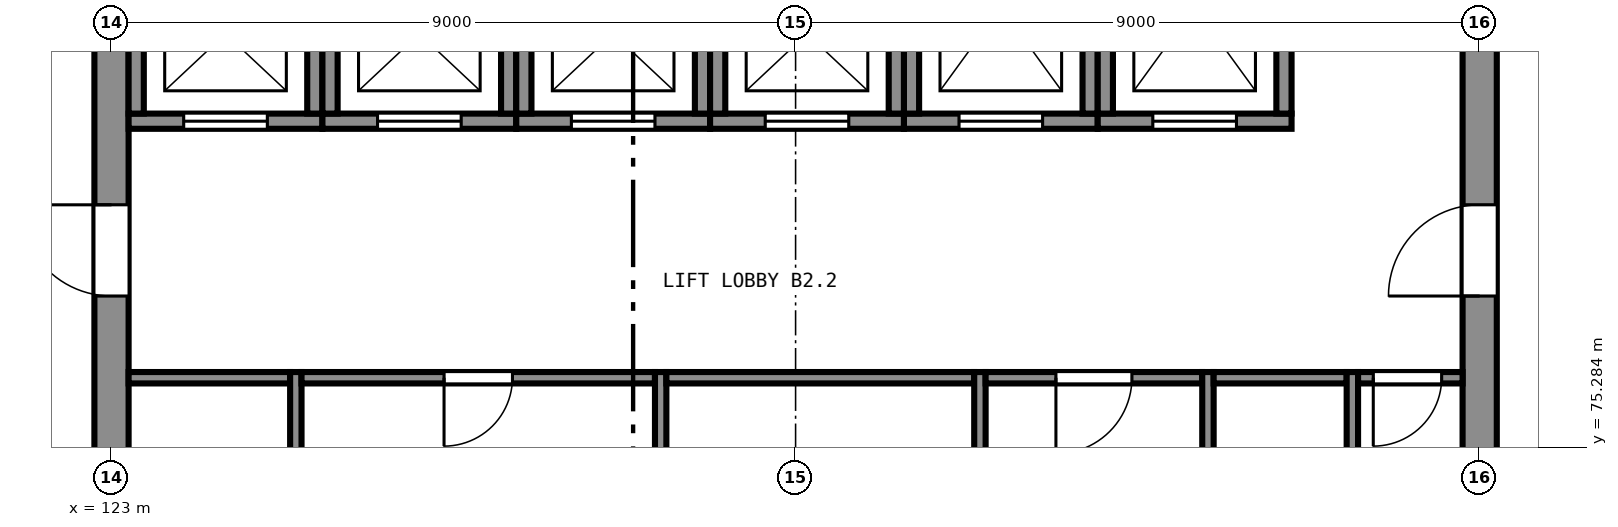
"""IFC4 building model, lengths in metres.
Left out: names, types, materials, properties, quantities, classifications, styles, units other than length and angle.
Written with IfcOpenShell. Run it as: python <this file> out.ifc"""

import sys

from ifc_helpers import new_model, si_unit, direction, frame, frame_2d, origin, place, context, subcontext, project, spatial, rectangle, extrude, element, fill, save


model = new_model("IFC4")
c1 = context("Model", 3, precision=1e-05, world=origin(), true_north=direction((0.0, 1.0)))
c2 = subcontext(c1, "Body", "Model", "MODEL_VIEW")
j1 = project(units=[si_unit("LENGTHUNIT", "METRE"), si_unit("PLANEANGLEUNIT", "RADIAN")], contexts=[c1])
p1 = place(None, origin())
s1 = spatial("IfcSite", under=j1, at=p1, CompositionType="ELEMENT")
p2 = place(p1, origin())
s2 = spatial("IfcBuilding", under=s1, at=p2, CompositionType="ELEMENT")
p3 = place(p2, frame((0.0, 0.0, -10.0)))
s3 = spatial("IfcBuildingStorey", under=s2, at=p3, CompositionType="ELEMENT", Elevation=-10.0)
p4 = place(p3, frame((141.0, 65.225, 0.0), z_axis=(0.0, 0.0, 1.0), x_axis=(0.0, 1.0, 0.0)))
e1 = element("IfcWall", 1, at=p4, inside=s3, PredefinedType="SHEAR", context=c2, shape_type="SweptSolid", body=[
    extrude(rectangle(XDim=17.55, YDim=0.45, at=frame_2d((8.775, 0.0))), origin(), (0.0, 0.0, 1.0), 5.0),
])
p5 = place(p4, frame((4.3, 0.0, 0.0)))
e2 = element("IfcOpeningElement", 2, at=p5, cuts=e1, PredefinedType="OPENING", context=c2, shape_type="SweptSolid", body=[
    extrude(rectangle(XDim=1.2, YDim=2.1, at=frame_2d((0.6, 1.05))), frame((0.0, 0.235, 0.0), z_axis=(0.0, -1.0, 0.0), x_axis=(1.0, 0.0, 0.0)), (0.0, 0.0, 1.0), 0.47),
])
p6 = place(p4, frame((12.05, 0.0, 0.0)))
e3 = element("IfcOpeningElement", 3, at=p6, cuts=e1, PredefinedType="OPENING", context=c2, shape_type="SweptSolid", body=[
    extrude(rectangle(XDim=1.2, YDim=2.1, at=frame_2d((0.6, 1.05))), frame((0.0, 0.235, 0.0), z_axis=(0.0, -1.0, 0.0), x_axis=(1.0, 0.0, 0.0)), (0.0, 0.0, 1.0), 0.47),
])
p7 = place(p3, frame((123.0, 82.775, 0.0), z_axis=(0.0, 0.0, 1.0), x_axis=(0.0, -1.0, 0.0)))
e4 = element("IfcWall", 4, at=p7, inside=s3, PredefinedType="SHEAR", context=c2, shape_type="SweptSolid", body=[
    extrude(rectangle(XDim=17.55, YDim=0.45, at=frame_2d((8.775, 0.0))), origin(), (0.0, 0.0, 1.0), 5.0),
])
p8 = place(p7, frame((12.05, 0.0, 0.0)))
e5 = element("IfcOpeningElement", 5, at=p8, cuts=e4, PredefinedType="OPENING", context=c2, shape_type="SweptSolid", body=[
    extrude(rectangle(XDim=1.2, YDim=2.1, at=frame_2d((0.6, 1.05))), frame((0.0, 0.235, 0.0), z_axis=(0.0, -1.0, 0.0), x_axis=(1.0, 0.0, 0.0)), (0.0, 0.0, 1.0), 0.47),
])
p9 = place(p7, frame((4.3, 0.0, 0.0)))
e6 = element("IfcOpeningElement", 6, at=p9, cuts=e4, PredefinedType="OPENING", context=c2, shape_type="SweptSolid", body=[
    extrude(rectangle(XDim=1.2, YDim=2.1, at=frame_2d((0.6, 1.05))), frame((0.0, 0.235, 0.0), z_axis=(0.0, -1.0, 0.0), x_axis=(1.0, 0.0, 0.0)), (0.0, 0.0, 1.0), 0.47),
])
p10 = place(p3, frame((123.225, 79.575, -1.9), z_axis=(0.0, 0.0, 1.0), x_axis=(1.0, 0.0, 0.0)))
e7 = element("IfcWall", 7, at=p10, inside=s3, PredefinedType="SHEAR", context=c2, shape_type="SweptSolid", body=[
    extrude(rectangle(XDim=2.55, YDim=0.2, at=frame_2d((1.275, 0.0))), origin(), (0.0, 0.0, 1.0), 6.9),
])
p11 = place(p10, frame((0.725, 0.0, 1.9)))
e8 = element("IfcOpeningElement", 8, at=p11, cuts=e7, PredefinedType="OPENING", context=c2, shape_type="SweptSolid", body=[
    extrude(rectangle(XDim=1.1, YDim=2.1, at=frame_2d((0.55, 1.05))), frame((0.0, 0.11, 0.0), z_axis=(0.0, -1.0, 0.0), x_axis=(1.0, 0.0, 0.0)), (0.0, 0.0, 1.0), 0.22),
])
for number, where, z_axis, x_axis in (
    (9, (125.675, 79.675, -1.9), (0.0, 0.0, 1.0), (0.0, 1.0, 0.0)),
    (10, (123.325, 81.775, -1.9), (0.0, 0.0, 1.0), (0.0, -1.0, 0.0)),
):
    element("IfcWall", number, at=place(p3, frame(where, z_axis=z_axis, x_axis=x_axis)), inside=s3, PredefinedType="SHEAR", context=c2, shape_type="SweptSolid", body=[
        extrude(rectangle(XDim=2.1, YDim=0.2, at=frame_2d((1.05, 0.0))), origin(), (0.0, 0.0, 1.0), 6.9),
    ])
p12 = place(p3, frame((125.775, 79.575, -1.9), z_axis=(0.0, 0.0, 1.0), x_axis=(1.0, 0.0, 0.0)))
e11 = element("IfcWall", 11, at=p12, inside=s3, PredefinedType="SHEAR", context=c2, shape_type="SweptSolid", body=[
    extrude(rectangle(XDim=2.55, YDim=0.2, at=frame_2d((1.275, 0.0))), origin(), (0.0, 0.0, 1.0), 6.9),
])
p13 = place(p12, frame((0.725, 0.0, 1.9)))
e12 = element("IfcOpeningElement", 12, at=p13, cuts=e11, PredefinedType="OPENING", context=c2, shape_type="SweptSolid", body=[
    extrude(rectangle(XDim=1.1, YDim=2.1, at=frame_2d((0.55, 1.05))), frame((0.0, 0.11, 0.0), z_axis=(0.0, -1.0, 0.0), x_axis=(1.0, 0.0, 0.0)), (0.0, 0.0, 1.0), 0.22),
])
for number, where, z_axis, x_axis in (
    (13, (128.225, 79.675, -1.9), (0.0, 0.0, 1.0), (0.0, 1.0, 0.0)),
    (14, (125.875, 81.775, -1.9), (0.0, 0.0, 1.0), (0.0, -1.0, 0.0)),
):
    element("IfcWall", number, at=place(p3, frame(where, z_axis=z_axis, x_axis=x_axis)), inside=s3, PredefinedType="SHEAR", context=c2, shape_type="SweptSolid", body=[
        extrude(rectangle(XDim=2.1, YDim=0.2, at=frame_2d((1.05, 0.0))), origin(), (0.0, 0.0, 1.0), 6.9),
    ])
p14 = place(p3, frame((128.325, 79.575, -1.9), z_axis=(0.0, 0.0, 1.0), x_axis=(1.0, 0.0, 0.0)))
e15 = element("IfcWall", 15, at=p14, inside=s3, PredefinedType="SHEAR", context=c2, shape_type="SweptSolid", body=[
    extrude(rectangle(XDim=2.55, YDim=0.2, at=frame_2d((1.275, 0.0))), origin(), (0.0, 0.0, 1.0), 6.9),
])
p15 = place(p14, frame((0.725, 0.0, 1.9)))
e16 = element("IfcOpeningElement", 16, at=p15, cuts=e15, PredefinedType="OPENING", context=c2, shape_type="SweptSolid", body=[
    extrude(rectangle(XDim=1.1, YDim=2.1, at=frame_2d((0.55, 1.05))), frame((0.0, 0.11, 0.0), z_axis=(0.0, -1.0, 0.0), x_axis=(1.0, 0.0, 0.0)), (0.0, 0.0, 1.0), 0.22),
])
for number, where, z_axis, x_axis in (
    (17, (130.775, 79.675, -1.9), (0.0, 0.0, 1.0), (0.0, 1.0, 0.0)),
    (18, (128.425, 81.775, -1.9), (0.0, 0.0, 1.0), (0.0, -1.0, 0.0)),
):
    element("IfcWall", number, at=place(p3, frame(where, z_axis=z_axis, x_axis=x_axis)), inside=s3, PredefinedType="SHEAR", context=c2, shape_type="SweptSolid", body=[
        extrude(rectangle(XDim=2.1, YDim=0.2, at=frame_2d((1.05, 0.0))), origin(), (0.0, 0.0, 1.0), 6.9),
    ])
p16 = place(p3, frame((130.875, 79.575, -1.9), z_axis=(0.0, 0.0, 1.0), x_axis=(1.0, 0.0, 0.0)))
e19 = element("IfcWall", 19, at=p16, inside=s3, PredefinedType="SHEAR", context=c2, shape_type="SweptSolid", body=[
    extrude(rectangle(XDim=2.55, YDim=0.2, at=frame_2d((1.275, 0.0))), origin(), (0.0, 0.0, 1.0), 6.9),
])
p17 = place(p16, frame((0.725, 0.0, 1.9)))
e20 = element("IfcOpeningElement", 20, at=p17, cuts=e19, PredefinedType="OPENING", context=c2, shape_type="SweptSolid", body=[
    extrude(rectangle(XDim=1.1, YDim=2.1, at=frame_2d((0.55, 1.05))), frame((0.0, 0.11, 0.0), z_axis=(0.0, -1.0, 0.0), x_axis=(1.0, 0.0, 0.0)), (0.0, 0.0, 1.0), 0.22),
])
for number, where, z_axis, x_axis in (
    (21, (133.325, 79.675, -1.9), (0.0, 0.0, 1.0), (0.0, 1.0, 0.0)),
    (22, (130.975, 81.775, -1.9), (0.0, 0.0, 1.0), (0.0, -1.0, 0.0)),
):
    element("IfcWall", number, at=place(p3, frame(where, z_axis=z_axis, x_axis=x_axis)), inside=s3, PredefinedType="SHEAR", context=c2, shape_type="SweptSolid", body=[
        extrude(rectangle(XDim=2.1, YDim=0.2, at=frame_2d((1.05, 0.0))), origin(), (0.0, 0.0, 1.0), 6.9),
    ])
p18 = place(p3, frame((133.425, 79.575, -1.9), z_axis=(0.0, 0.0, 1.0), x_axis=(1.0, 0.0, 0.0)))
e23 = element("IfcWall", 23, at=p18, inside=s3, PredefinedType="SHEAR", context=c2, shape_type="SweptSolid", body=[
    extrude(rectangle(XDim=2.55, YDim=0.2, at=frame_2d((1.275, 0.0))), origin(), (0.0, 0.0, 1.0), 6.9),
])
p19 = place(p18, frame((0.725, 0.0, 1.9)))
e24 = element("IfcOpeningElement", 24, at=p19, cuts=e23, PredefinedType="OPENING", context=c2, shape_type="SweptSolid", body=[
    extrude(rectangle(XDim=1.1, YDim=2.1, at=frame_2d((0.55, 1.05))), frame((0.0, 0.11, 0.0), z_axis=(0.0, -1.0, 0.0), x_axis=(1.0, 0.0, 0.0)), (0.0, 0.0, 1.0), 0.22),
])
for number, where, z_axis, x_axis in (
    (25, (135.875, 79.675, -1.9), (0.0, 0.0, 1.0), (0.0, 1.0, 0.0)),
    (26, (133.525, 82.475, -1.9), (0.0, 0.0, 1.0), (0.0, -1.0, 0.0)),
):
    element("IfcWall", number, at=place(p3, frame(where, z_axis=z_axis, x_axis=x_axis)), inside=s3, PredefinedType="SHEAR", context=c2, shape_type="SweptSolid", body=[
        extrude(rectangle(XDim=2.8, YDim=0.2, at=frame_2d((1.4, 0.0))), origin(), (0.0, 0.0, 1.0), 6.9),
    ])
p20 = place(p3, frame((135.975, 79.575, -1.9), z_axis=(0.0, 0.0, 1.0), x_axis=(1.0, 0.0, 0.0)))
e27 = element("IfcWall", 27, at=p20, inside=s3, PredefinedType="SHEAR", context=c2, shape_type="SweptSolid", body=[
    extrude(rectangle(XDim=2.55, YDim=0.2, at=frame_2d((1.275, 0.0))), origin(), (0.0, 0.0, 1.0), 6.9),
])
p21 = place(p20, frame((0.725, 0.0, 1.9)))
e28 = element("IfcOpeningElement", 28, at=p21, cuts=e27, PredefinedType="OPENING", context=c2, shape_type="SweptSolid", body=[
    extrude(rectangle(XDim=1.1, YDim=2.1, at=frame_2d((0.55, 1.05))), frame((0.0, 0.11, 0.0), z_axis=(0.0, -1.0, 0.0), x_axis=(1.0, 0.0, 0.0)), (0.0, 0.0, 1.0), 0.22),
])
for number, where, z_axis, x_axis in (
    (29, (138.425, 79.675, -1.9), (0.0, 0.0, 1.0), (0.0, 1.0, 0.0)),
    (30, (136.075, 82.475, -1.9), (0.0, 0.0, 1.0), (0.0, -1.0, 0.0)),
):
    element("IfcWall", number, at=place(p3, frame(where, z_axis=z_axis, x_axis=x_axis)), inside=s3, PredefinedType="SHEAR", context=c2, shape_type="SweptSolid", body=[
        extrude(rectangle(XDim=2.8, YDim=0.2, at=frame_2d((1.4, 0.0))), origin(), (0.0, 0.0, 1.0), 6.9),
    ])
p22 = place(p3, frame((125.425, 71.725, 0.0), z_axis=(0.0, 0.0, 1.0), x_axis=(0.0, 1.0, 0.0)))
e31 = element("IfcWall", 31, at=p22, inside=s3, PredefinedType="PARTITIONING", context=c2, shape_type="SweptSolid", body=[
    extrude(rectangle(XDim=4.55, YDim=0.15, at=frame_2d((2.275, 0.0))), origin(), (0.0, 0.0, 1.0), 4.7),
])
p23 = place(p3, frame((123.225, 76.2, 0.0), z_axis=(0.0, 0.0, 1.0), x_axis=(1.0, 0.0, 0.0)))
e32 = element("IfcWall", 32, at=p23, inside=s3, PredefinedType="PARTITIONING", context=c2, shape_type="SweptSolid", body=[
    extrude(rectangle(XDim=2.125, YDim=0.15, at=frame_2d((1.062, 0.0))), origin(), (0.0, 0.0, 1.0), 4.7),
])
p24 = place(p3, frame((130.225, 71.725, 0.0), z_axis=(0.0, 0.0, 1.0), x_axis=(0.0, 1.0, 0.0)))
e33 = element("IfcWall", 33, at=p24, inside=s3, PredefinedType="PARTITIONING", context=c2, shape_type="SweptSolid", body=[
    extrude(rectangle(XDim=4.55, YDim=0.15, at=frame_2d((2.275, 0.0))), origin(), (0.0, 0.0, 1.0), 4.7),
])
p25 = place(p3, frame((125.5, 76.2, 0.0), z_axis=(0.0, 0.0, 1.0), x_axis=(1.0, 0.0, 0.0)))
e34 = element("IfcWall", 34, at=p25, inside=s3, PredefinedType="PARTITIONING", context=c2, shape_type="SweptSolid", body=[
    extrude(rectangle(XDim=4.65, YDim=0.15, at=frame_2d((2.325, 0.0))), origin(), (0.0, 0.0, 1.0), 4.7),
])
p26 = place(p25, frame((1.875, 0.0, 0.0)))
e35 = element("IfcOpeningElement", 35, at=p26, cuts=e34, PredefinedType="OPENING", context=c2, shape_type="SweptSolid", body=[
    extrude(rectangle(XDim=0.9, YDim=2.1, at=frame_2d((0.45, 1.05))), frame((0.0, 0.085, 0.0), z_axis=(0.0, -1.0, 0.0), x_axis=(1.0, 0.0, 0.0)), (0.0, 0.0, 1.0), 0.17),
])
p27 = place(p3, frame((134.425, 71.725, 0.0), z_axis=(0.0, 0.0, 1.0), x_axis=(0.0, 1.0, 0.0)))
e36 = element("IfcWall", 36, at=p27, inside=s3, PredefinedType="PARTITIONING", context=c2, shape_type="SweptSolid", body=[
    extrude(rectangle(XDim=4.55, YDim=0.15, at=frame_2d((2.275, 0.0))), origin(), (0.0, 0.0, 1.0), 4.7),
])
p28 = place(p3, frame((130.3, 76.2, 0.0), z_axis=(0.0, 0.0, 1.0), x_axis=(1.0, 0.0, 0.0)))
e37 = element("IfcWall", 37, at=p28, inside=s3, PredefinedType="PARTITIONING", context=c2, shape_type="SweptSolid", body=[
    extrude(rectangle(XDim=4.05, YDim=0.15, at=frame_2d((2.025, 0.0))), origin(), (0.0, 0.0, 1.0), 4.7),
])
p29 = place(p3, frame((137.425, 71.725, 0.0), z_axis=(0.0, 0.0, 1.0), x_axis=(0.0, 1.0, 0.0)))
e38 = element("IfcWall", 38, at=p29, inside=s3, PredefinedType="PARTITIONING", context=c2, shape_type="SweptSolid", body=[
    extrude(rectangle(XDim=4.55, YDim=0.15, at=frame_2d((2.275, 0.0))), origin(), (0.0, 0.0, 1.0), 4.7),
])
p30 = place(p3, frame((134.5, 76.2, 0.0), z_axis=(0.0, 0.0, 1.0), x_axis=(1.0, 0.0, 0.0)))
e39 = element("IfcWall", 39, at=p30, inside=s3, PredefinedType="PARTITIONING", context=c2, shape_type="SweptSolid", body=[
    extrude(rectangle(XDim=2.85, YDim=0.15, at=frame_2d((1.425, 0.0))), origin(), (0.0, 0.0, 1.0), 4.7),
])
p31 = place(p30, frame((0.925, 0.0, 0.0)))
e40 = element("IfcOpeningElement", 40, at=p31, cuts=e39, PredefinedType="OPENING", context=c2, shape_type="SweptSolid", body=[
    extrude(rectangle(XDim=1.0, YDim=2.1, at=frame_2d((0.5, 1.05))), frame((0.0, 0.085, 0.0), z_axis=(0.0, -1.0, 0.0), x_axis=(1.0, 0.0, 0.0)), (0.0, 0.0, 1.0), 0.17),
])
p32 = place(p3, frame((139.325, 71.725, 0.0), z_axis=(0.0, 0.0, 1.0), x_axis=(0.0, 1.0, 0.0)))
e41 = element("IfcWall", 41, at=p32, inside=s3, PredefinedType="PARTITIONING", context=c2, shape_type="SweptSolid", body=[
    extrude(rectangle(XDim=4.55, YDim=0.15, at=frame_2d((2.275, 0.0))), origin(), (0.0, 0.0, 1.0), 4.7),
])
p33 = place(p3, frame((137.5, 76.2, 0.0), z_axis=(0.0, 0.0, 1.0), x_axis=(1.0, 0.0, 0.0)))
e42 = element("IfcWall", 42, at=p33, inside=s3, PredefinedType="PARTITIONING", context=c2, shape_type="SweptSolid", body=[
    extrude(rectangle(XDim=1.75, YDim=0.15, at=frame_2d((0.875, 0.0))), origin(), (0.0, 0.0, 1.0), 4.7),
])
p34 = place(p3, frame((139.4, 76.2, 0.0), z_axis=(0.0, 0.0, 1.0), x_axis=(1.0, 0.0, 0.0)))
e43 = element("IfcWall", 43, at=p34, inside=s3, PredefinedType="PARTITIONING", context=c2, shape_type="SweptSolid", body=[
    extrude(rectangle(XDim=1.375, YDim=0.15, at=frame_2d((0.688, 0.0))), origin(), (0.0, 0.0, 1.0), 4.7),
])
p35 = place(p34, frame((0.2, 0.0, 0.0)))
e44 = element("IfcOpeningElement", 44, at=p35, cuts=e43, PredefinedType="OPENING", context=c2, shape_type="SweptSolid", body=[
    extrude(rectangle(XDim=0.9, YDim=2.1, at=frame_2d((0.45, 1.05))), frame((0.0, 0.085, 0.0), z_axis=(0.0, -1.0, 0.0), x_axis=(1.0, 0.0, 0.0)), (0.0, 0.0, 1.0), 0.17),
])
p36 = place(p11, origin())
e45 = element("IfcDoor", 45, at=p36, inside=s3, OperationType="SLIDING_TO_LEFT", PredefinedType="DOOR", context=c2, shape_type="SweptSolid", body=[
    extrude(rectangle(XDim=1.1, YDim=2.1, at=frame_2d((0.55, 1.05))), frame((0.0, 0.025, 0.0), z_axis=(0.0, -1.0, 0.0), x_axis=(1.0, 0.0, 0.0)), (0.0, 0.0, 1.0), 0.05),
])
fill(e8, e45)
p37 = place(p13, origin())
e46 = element("IfcDoor", 46, at=p37, inside=s3, OperationType="SLIDING_TO_LEFT", PredefinedType="DOOR", context=c2, shape_type="SweptSolid", body=[
    extrude(rectangle(XDim=1.1, YDim=2.1, at=frame_2d((0.55, 1.05))), frame((0.0, 0.025, 0.0), z_axis=(0.0, -1.0, 0.0), x_axis=(1.0, 0.0, 0.0)), (0.0, 0.0, 1.0), 0.05),
])
fill(e12, e46)
p38 = place(p15, origin())
e47 = element("IfcDoor", 47, at=p38, inside=s3, OperationType="SLIDING_TO_LEFT", PredefinedType="DOOR", context=c2, shape_type="SweptSolid", body=[
    extrude(rectangle(XDim=1.1, YDim=2.1, at=frame_2d((0.55, 1.05))), frame((0.0, 0.025, 0.0), z_axis=(0.0, -1.0, 0.0), x_axis=(1.0, 0.0, 0.0)), (0.0, 0.0, 1.0), 0.05),
])
fill(e16, e47)
p39 = place(p17, origin())
e48 = element("IfcDoor", 48, at=p39, inside=s3, OperationType="SLIDING_TO_LEFT", PredefinedType="DOOR", context=c2, shape_type="SweptSolid", body=[
    extrude(rectangle(XDim=1.1, YDim=2.1, at=frame_2d((0.55, 1.05))), frame((0.0, 0.025, 0.0), z_axis=(0.0, -1.0, 0.0), x_axis=(1.0, 0.0, 0.0)), (0.0, 0.0, 1.0), 0.05),
])
fill(e20, e48)
p40 = place(p19, origin())
e49 = element("IfcDoor", 49, at=p40, inside=s3, OperationType="SLIDING_TO_LEFT", PredefinedType="DOOR", context=c2, shape_type="SweptSolid", body=[
    extrude(rectangle(XDim=1.1, YDim=2.1, at=frame_2d((0.55, 1.05))), frame((0.0, 0.025, 0.0), z_axis=(0.0, -1.0, 0.0), x_axis=(1.0, 0.0, 0.0)), (0.0, 0.0, 1.0), 0.05),
])
fill(e24, e49)
p41 = place(p21, origin())
e50 = element("IfcDoor", 50, at=p41, inside=s3, OperationType="SLIDING_TO_LEFT", PredefinedType="DOOR", context=c2, shape_type="SweptSolid", body=[
    extrude(rectangle(XDim=1.1, YDim=2.1, at=frame_2d((0.55, 1.05))), frame((0.0, 0.025, 0.0), z_axis=(0.0, -1.0, 0.0), x_axis=(1.0, 0.0, 0.0)), (0.0, 0.0, 1.0), 0.05),
])
fill(e28, e50)
p42 = place(p9, frame((1.2, 0.0, 0.0), z_axis=(0.0, 0.0, 1.0), x_axis=(-1.0, 0.0, 0.0)))
e51 = element("IfcDoor", 51, at=p42, inside=s3, OperationType="SINGLE_SWING_LEFT", PredefinedType="DOOR", context=c2, shape_type="SweptSolid", body=[
    extrude(rectangle(XDim=1.2, YDim=2.1, at=frame_2d((0.6, 1.05))), frame((0.0, 0.025, 0.0), z_axis=(0.0, -1.0, 0.0), x_axis=(1.0, 0.0, 0.0)), (0.0, 0.0, 1.0), 0.05),
])
fill(e6, e51)
p43 = place(p6, origin())
e52 = element("IfcDoor", 52, at=p43, inside=s3, OperationType="SINGLE_SWING_RIGHT", PredefinedType="DOOR", context=c2, shape_type="SweptSolid", body=[
    extrude(rectangle(XDim=1.2, YDim=2.1, at=frame_2d((0.6, 1.05))), frame((0.0, 0.025, 0.0), z_axis=(0.0, -1.0, 0.0), x_axis=(1.0, 0.0, 0.0)), (0.0, 0.0, 1.0), 0.05),
])
fill(e3, e52)
p44 = place(p26, frame((0.9, 0.0, 0.0), z_axis=(0.0, 0.0, 1.0), x_axis=(-1.0, 0.0, 0.0)))
e53 = element("IfcDoor", 53, at=p44, inside=s3, OperationType="SINGLE_SWING_LEFT", PredefinedType="DOOR", context=c2, shape_type="SweptSolid", body=[
    extrude(rectangle(XDim=0.9, YDim=2.1, at=frame_2d((0.45, 1.05))), frame((0.0, 0.025, 0.0), z_axis=(0.0, -1.0, 0.0), x_axis=(1.0, 0.0, 0.0)), (0.0, 0.0, 1.0), 0.05),
])
fill(e35, e53)
p45 = place(p31, frame((1.0, 0.0, 0.0), z_axis=(0.0, 0.0, 1.0), x_axis=(-1.0, 0.0, 0.0)))
e54 = element("IfcDoor", 54, at=p45, inside=s3, OperationType="SINGLE_SWING_LEFT", PredefinedType="DOOR", context=c2, shape_type="SweptSolid", body=[
    extrude(rectangle(XDim=1.0, YDim=2.1, at=frame_2d((0.5, 1.05))), frame((0.0, 0.025, 0.0), z_axis=(0.0, -1.0, 0.0), x_axis=(1.0, 0.0, 0.0)), (0.0, 0.0, 1.0), 0.05),
])
fill(e40, e54)
p46 = place(p35, frame((0.9, 0.0, 0.0), z_axis=(0.0, 0.0, 1.0), x_axis=(-1.0, 0.0, 0.0)))
e55 = element("IfcDoor", 55, at=p46, inside=s3, OperationType="SINGLE_SWING_LEFT", PredefinedType="DOOR", context=c2, shape_type="SweptSolid", body=[
    extrude(rectangle(XDim=0.9, YDim=2.1, at=frame_2d((0.45, 1.05))), frame((0.0, 0.025, 0.0), z_axis=(0.0, -1.0, 0.0), x_axis=(1.0, 0.0, 0.0)), (0.0, 0.0, 1.0), 0.05),
])
fill(e44, e55)
save(model, sys.argv[1])
